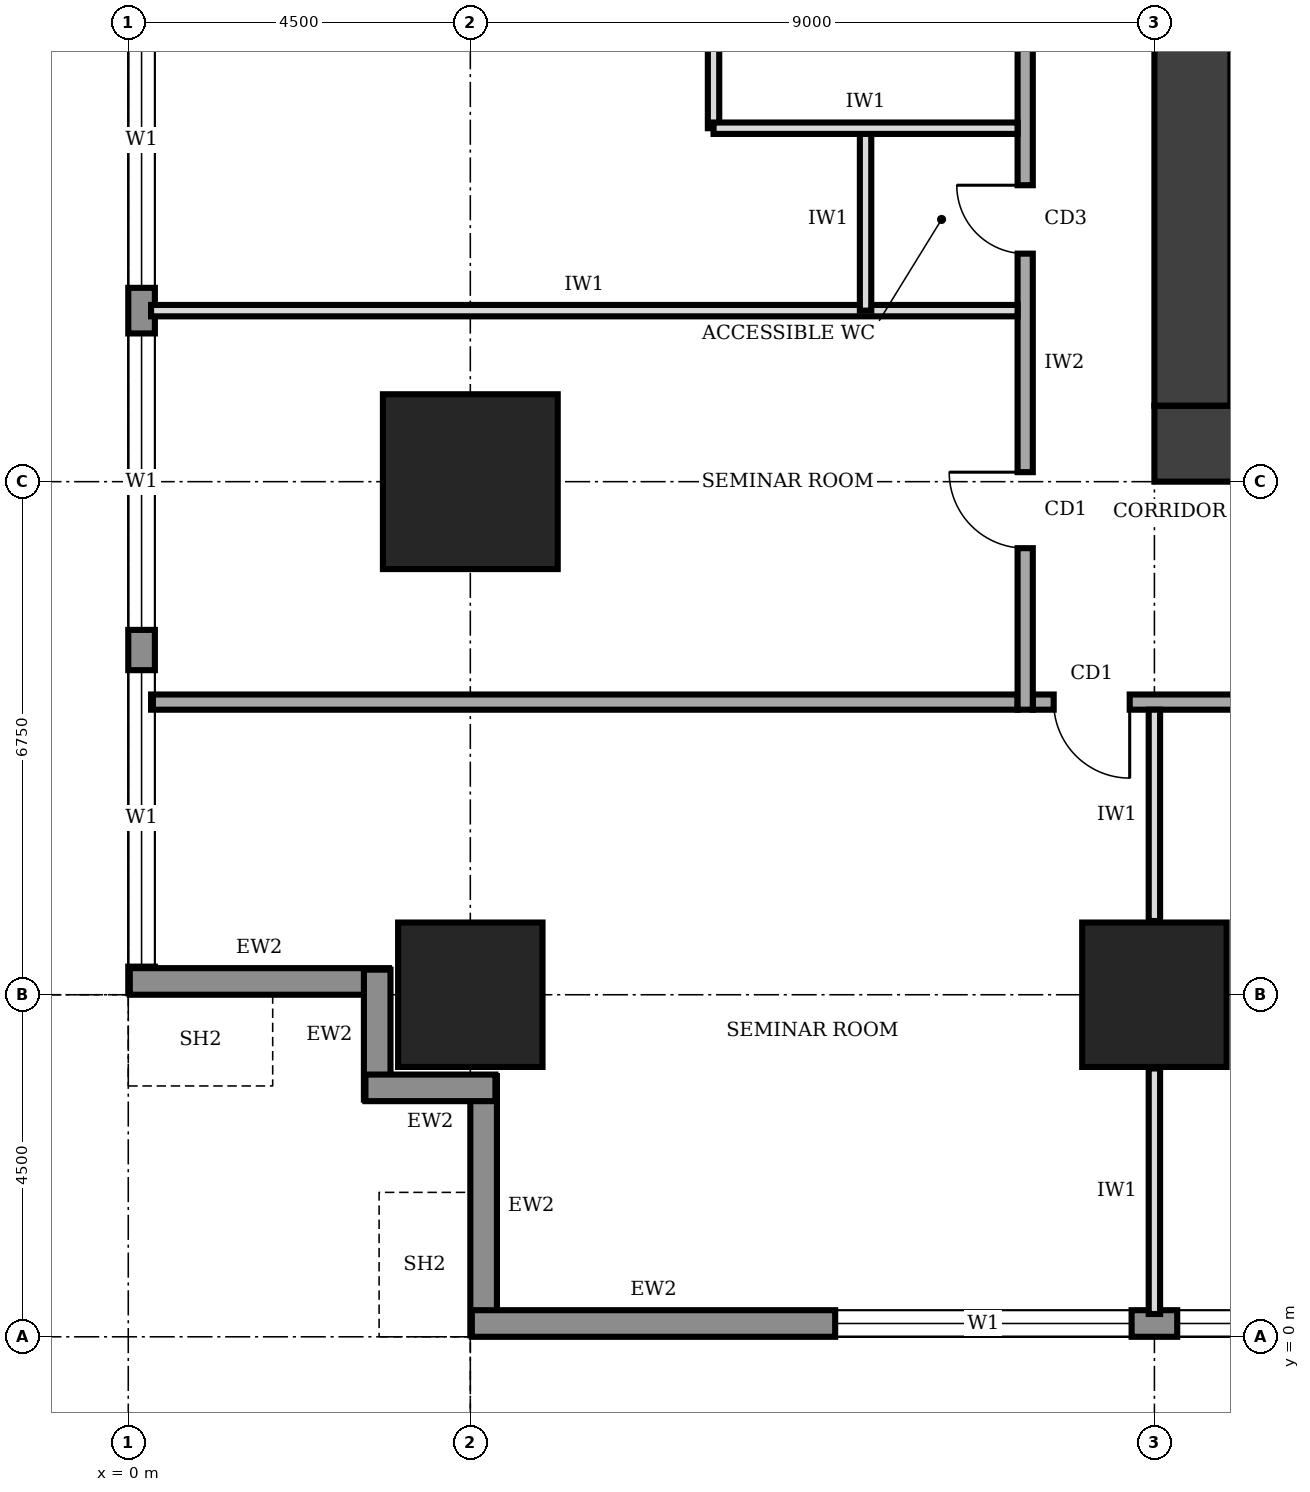
"""IFC4 building model, lengths in metres.
Left out: names, types, materials, properties, quantities, classifications, styles, units other than length and angle.
Written with IfcOpenShell. Run it as: python <this file> out.ifc"""

import sys

from ifc_helpers import new_model, si_unit, direction, frame, frame_2d, origin, origin_2d, place, context, subcontext, project, spatial, rectangle, extrude, element, fill, save


model = new_model("IFC4")
c1 = context("Model", 3, precision=1e-05, world=origin(), true_north=direction((0.0, 1.0)))
c2 = subcontext(c1, "Body", "Model", "MODEL_VIEW")
j1 = project(units=[si_unit("LENGTHUNIT", "METRE"), si_unit("PLANEANGLEUNIT", "RADIAN")], contexts=[c1])
p1 = place(None, origin())
s1 = spatial("IfcSite", under=j1, at=p1, CompositionType="ELEMENT")
p2 = place(p1, origin())
s2 = spatial("IfcBuilding", under=s1, at=p2, CompositionType="ELEMENT")
p3 = place(p2, frame((0.0, 0.0, 113.0)))
s3 = spatial("IfcBuildingStorey", under=s2, at=p3, CompositionType="ELEMENT", Elevation=113.0)
p4 = place(p3, frame((13.5, 11.75, 0.0), z_axis=(0.0, 0.0, 1.0), x_axis=(1.0, 0.0, 0.0)))
e1 = element("IfcWall", 1, at=p4, inside=s3, PredefinedType="SHEAR", context=c2, shape_type="SweptSolid", body=[
    extrude(rectangle(XDim=13.5, YDim=1.0, at=frame_2d((6.75, 0.0))), origin(), (0.0, 0.0, 1.0), 4.0),
])
p5 = place(p4, frame((4.75, 0.0, 0.0)))
e2 = element("IfcOpeningElement", 2, at=p5, cuts=e1, PredefinedType="OPENING", context=c2, shape_type="SweptSolid", body=[
    extrude(rectangle(XDim=1.0, YDim=2.1, at=frame_2d((0.5, 1.05))), frame((0.0, 0.51, 0.0), z_axis=(0.0, -1.0, 0.0), x_axis=(1.0, 0.0, 0.0)), (0.0, 0.0, 1.0), 1.02),
])
p6 = place(p3, frame((14.0, 28.25, 0.0), z_axis=(0.0, 0.0, 1.0), x_axis=(0.0, -1.0, 0.0)))
e3 = element("IfcWall", 3, at=p6, inside=s3, PredefinedType="SHEAR", context=c2, shape_type="SweptSolid", body=[
    extrude(rectangle(XDim=16.0, YDim=1.0, at=frame_2d((8.0, 0.0))), origin(), (0.0, 0.0, 1.0), 4.0),
])
for number, where, z_axis, x_axis in (
    (4, (4.5, 4.5, 0.0), (0.0, 0.0, 1.0), (1.0, 0.0, 0.0)),
    (5, (13.5, 4.5, 0.0), (0.0, 0.0, 1.0), (1.0, 0.0, 0.0)),
):
    element("IfcColumn", number, at=place(p3, frame(where, z_axis=z_axis, x_axis=x_axis)), inside=s3, PredefinedType="COLUMN", context=c2, shape_type="SweptSolid", body=[
        extrude(rectangle(XDim=1.9, YDim=1.9, at=origin_2d()), origin(), (0.0, 0.0, 1.0), 4.0),
    ])
p7 = place(p3, frame((4.5, 11.25, 0.0), z_axis=(0.0, 0.0, 1.0), x_axis=(1.0, 0.0, 0.0)))
e6 = element("IfcColumn", 6, at=p7, inside=s3, PredefinedType="COLUMN", context=c2, shape_type="SweptSolid", body=[
    extrude(rectangle(XDim=2.3, YDim=2.3, at=origin_2d()), origin(), (0.0, 0.0, 1.0), 4.0),
])
p8 = place(p3, frame((4.675, 3.43, 0.0), z_axis=(0.0, 0.0, 1.0), x_axis=(0.0, -1.0, 0.0)))
e7 = element("IfcWall", 7, at=p8, inside=s3, PredefinedType="STANDARD", context=c2, shape_type="SweptSolid", body=[
    extrude(rectangle(XDim=3.41, YDim=0.35, at=frame_2d((1.705, 0.0))), origin(), (0.0, 0.0, 1.0), 2.85),
])
p9 = place(p3, frame((4.52, 0.175, 0.0), z_axis=(0.0, 0.0, 1.0), x_axis=(1.0, 0.0, 0.0)))
e8 = element("IfcWall", 8, at=p9, inside=s3, PredefinedType="STANDARD", context=c2, shape_type="SweptSolid", body=[
    extrude(rectangle(XDim=31.46, YDim=0.35, at=frame_2d((15.73, 0.0))), origin(), (0.0, 0.0, 1.0), 3.75),
])
p10 = place(p9, frame((4.78, 0.0, 0.9)))
e9 = element("IfcOpeningElement", 9, at=p10, cuts=e8, PredefinedType="OPENING", context=c2, shape_type="SweptSolid", body=[
    extrude(rectangle(XDim=3.9, YDim=2.2, at=frame_2d((1.95, 1.1))), frame((0.0, 0.185, 0.0), z_axis=(0.0, -1.0, 0.0), x_axis=(1.0, 0.0, 0.0)), (0.0, 0.0, 1.0), 0.37),
])
p11 = place(p9, frame((9.28, 0.0, 0.9)))
e10 = element("IfcOpeningElement", 10, at=p11, cuts=e8, PredefinedType="OPENING", context=c2, shape_type="SweptSolid", body=[
    extrude(rectangle(XDim=3.9, YDim=2.2, at=frame_2d((1.95, 1.1))), frame((0.0, 0.185, 0.0), z_axis=(0.0, -1.0, 0.0), x_axis=(1.0, 0.0, 0.0)), (0.0, 0.0, 1.0), 0.37),
])
p12 = place(p9, frame((13.78, 0.0, 0.9)))
e11 = element("IfcOpeningElement", 11, at=p12, cuts=e8, PredefinedType="OPENING", context=c2, shape_type="SweptSolid", body=[
    extrude(rectangle(XDim=3.9, YDim=2.2, at=frame_2d((1.95, 1.1))), frame((0.0, 0.185, 0.0), z_axis=(0.0, -1.0, 0.0), x_axis=(1.0, 0.0, 0.0)), (0.0, 0.0, 1.0), 0.37),
])
p13 = place(p9, frame((18.28, 0.0, 0.9)))
e12 = element("IfcOpeningElement", 12, at=p13, cuts=e8, PredefinedType="OPENING", context=c2, shape_type="SweptSolid", body=[
    extrude(rectangle(XDim=3.9, YDim=2.2, at=frame_2d((1.95, 1.1))), frame((0.0, 0.185, 0.0), z_axis=(0.0, -1.0, 0.0), x_axis=(1.0, 0.0, 0.0)), (0.0, 0.0, 1.0), 0.37),
])
p14 = place(p9, frame((22.78, 0.0, 0.9)))
e13 = element("IfcOpeningElement", 13, at=p14, cuts=e8, PredefinedType="OPENING", context=c2, shape_type="SweptSolid", body=[
    extrude(rectangle(XDim=3.9, YDim=2.2, at=frame_2d((1.95, 1.1))), frame((0.0, 0.185, 0.0), z_axis=(0.0, -1.0, 0.0), x_axis=(1.0, 0.0, 0.0)), (0.0, 0.0, 1.0), 0.37),
])
p15 = place(p9, frame((27.21, 0.0, 0.9)))
e14 = element("IfcOpeningElement", 14, at=p15, cuts=e8, PredefinedType="OPENING", context=c2, shape_type="SweptSolid", body=[
    extrude(rectangle(XDim=3.9, YDim=2.2, at=frame_2d((1.95, 1.1))), frame((0.0, 0.185, 0.0), z_axis=(0.0, -1.0, 0.0), x_axis=(1.0, 0.0, 0.0)), (0.0, 0.0, 1.0), 0.37),
])
p16 = place(p3, frame((0.175, 35.98, 0.0), z_axis=(0.0, 0.0, 1.0), x_axis=(0.0, -1.0, 0.0)))
e15 = element("IfcWall", 15, at=p16, inside=s3, PredefinedType="STANDARD", context=c2, shape_type="SweptSolid", body=[
    extrude(rectangle(XDim=31.46, YDim=0.35, at=frame_2d((15.73, 0.0))), origin(), (0.0, 0.0, 1.0), 3.75),
])
p17 = place(p16, frame((27.21, 0.0, 0.9)))
e16 = element("IfcOpeningElement", 16, at=p17, cuts=e15, PredefinedType="OPENING", context=c2, shape_type="SweptSolid", body=[
    extrude(rectangle(XDim=3.9, YDim=2.2, at=frame_2d((1.95, 1.1))), frame((0.0, 0.185, 0.0), z_axis=(0.0, -1.0, 0.0), x_axis=(1.0, 0.0, 0.0)), (0.0, 0.0, 1.0), 0.37),
])
p18 = place(p16, frame((22.78, 0.0, 0.9)))
e17 = element("IfcOpeningElement", 17, at=p18, cuts=e15, PredefinedType="OPENING", context=c2, shape_type="SweptSolid", body=[
    extrude(rectangle(XDim=3.9, YDim=2.2, at=frame_2d((1.95, 1.1))), frame((0.0, 0.185, 0.0), z_axis=(0.0, -1.0, 0.0), x_axis=(1.0, 0.0, 0.0)), (0.0, 0.0, 1.0), 0.37),
])
p19 = place(p16, frame((18.28, 0.0, 0.9)))
e18 = element("IfcOpeningElement", 18, at=p19, cuts=e15, PredefinedType="OPENING", context=c2, shape_type="SweptSolid", body=[
    extrude(rectangle(XDim=3.9, YDim=2.2, at=frame_2d((1.95, 1.1))), frame((0.0, 0.185, 0.0), z_axis=(0.0, -1.0, 0.0), x_axis=(1.0, 0.0, 0.0)), (0.0, 0.0, 1.0), 0.37),
])
p20 = place(p16, frame((13.78, 0.0, 0.9)))
e19 = element("IfcOpeningElement", 19, at=p20, cuts=e15, PredefinedType="OPENING", context=c2, shape_type="SweptSolid", body=[
    extrude(rectangle(XDim=3.9, YDim=2.2, at=frame_2d((1.95, 1.1))), frame((0.0, 0.185, 0.0), z_axis=(0.0, -1.0, 0.0), x_axis=(1.0, 0.0, 0.0)), (0.0, 0.0, 1.0), 0.37),
])
p21 = place(p16, frame((9.28, 0.0, 0.9)))
e20 = element("IfcOpeningElement", 20, at=p21, cuts=e15, PredefinedType="OPENING", context=c2, shape_type="SweptSolid", body=[
    extrude(rectangle(XDim=3.9, YDim=2.2, at=frame_2d((1.95, 1.1))), frame((0.0, 0.185, 0.0), z_axis=(0.0, -1.0, 0.0), x_axis=(1.0, 0.0, 0.0)), (0.0, 0.0, 1.0), 0.37),
])
p22 = place(p16, frame((4.78, 0.0, 0.9)))
e21 = element("IfcOpeningElement", 21, at=p22, cuts=e15, PredefinedType="OPENING", context=c2, shape_type="SweptSolid", body=[
    extrude(rectangle(XDim=3.9, YDim=2.2, at=frame_2d((1.95, 1.1))), frame((0.0, 0.185, 0.0), z_axis=(0.0, -1.0, 0.0), x_axis=(1.0, 0.0, 0.0)), (0.0, 0.0, 1.0), 0.37),
])
p23 = place(p3, frame((0.02, 4.675, 0.0), z_axis=(0.0, 0.0, 1.0), x_axis=(1.0, 0.0, 0.0)))
e22 = element("IfcWall", 22, at=p23, inside=s3, PredefinedType="STANDARD", context=c2, shape_type="SweptSolid", body=[
    extrude(rectangle(XDim=3.41, YDim=0.35, at=frame_2d((1.705, 0.0))), origin(), (0.0, 0.0, 1.0), 2.85),
])
for number, where, z_axis, x_axis in (
    (23, (3.275, 4.83, 0.0), (0.0, 0.0, 1.0), (0.0, -1.0, 0.0)),
    (24, (3.12, 3.275, 0.0), (0.0, 0.0, 1.0), (1.0, 0.0, 0.0)),
):
    element("IfcWall", number, at=place(p3, frame(where, z_axis=z_axis, x_axis=x_axis)), inside=s3, PredefinedType="STANDARD", context=c2, shape_type="SweptSolid", body=[
        extrude(rectangle(XDim=1.71, YDim=0.35, at=frame_2d((0.855, 0.0))), origin(), (0.0, 0.0, 1.0), 3.75),
    ])
p24 = place(p3, frame((11.9, 8.35, 0.0), z_axis=(0.0, 0.0, 1.0), x_axis=(1.0, 0.0, 0.0)))
e25 = element("IfcWall", 25, at=p24, inside=s3, PredefinedType="SOLIDWALL", context=c2, shape_type="SweptSolid", body=[
    extrude(rectangle(XDim=16.9, YDim=0.2, at=frame_2d((8.45, 0.0))), origin(), (0.0, 0.0, 1.0), 3.75),
])
p25 = place(p24, frame((0.275, 0.0, 0.0)))
e26 = element("IfcOpeningElement", 26, at=p25, cuts=e25, PredefinedType="OPENING", context=c2, shape_type="SweptSolid", body=[
    extrude(rectangle(XDim=1.0, YDim=2.1, at=frame_2d((0.5, 1.05))), frame((0.0, 0.11, 0.0), z_axis=(0.0, -1.0, 0.0), x_axis=(1.0, 0.0, 0.0)), (0.0, 0.0, 1.0), 0.22),
])
p26 = place(p24, frame((5.6, 0.0, 0.0)))
e27 = element("IfcOpeningElement", 27, at=p26, cuts=e25, PredefinedType="OPENING", context=c2, shape_type="SweptSolid", body=[
    extrude(rectangle(XDim=1.0, YDim=2.1, at=frame_2d((0.5, 1.05))), frame((0.0, 0.11, 0.0), z_axis=(0.0, -1.0, 0.0), x_axis=(1.0, 0.0, 0.0)), (0.0, 0.0, 1.0), 0.22),
])
p27 = place(p24, frame((12.85, 0.0, 0.0)))
e28 = element("IfcOpeningElement", 28, at=p27, cuts=e25, PredefinedType="OPENING", context=c2, shape_type="SweptSolid", body=[
    extrude(rectangle(XDim=1.8, YDim=2.1, at=frame_2d((0.9, 1.05))), frame((0.0, 0.11, 0.0), z_axis=(0.0, -1.0, 0.0), x_axis=(1.0, 0.0, 0.0)), (0.0, 0.0, 1.0), 0.22),
])
p28 = place(p3, frame((11.8, 32.05, 0.0), z_axis=(0.0, 0.0, 1.0), x_axis=(0.0, -1.0, 0.0)))
e29 = element("IfcWall", 29, at=p28, inside=s3, PredefinedType="SOLIDWALL", context=c2, shape_type="SweptSolid", body=[
    extrude(rectangle(XDim=23.8, YDim=0.2, at=frame_2d((11.9, 0.0))), origin(), (0.0, 0.0, 1.0), 3.75),
])
p29 = place(p28, frame((20.675, 0.0, 0.0)))
e30 = element("IfcOpeningElement", 30, at=p29, cuts=e29, PredefinedType="OPENING", context=c2, shape_type="SweptSolid", body=[
    extrude(rectangle(XDim=1.0, YDim=2.1, at=frame_2d((0.5, 1.05))), frame((0.0, 0.11, 0.0), z_axis=(0.0, -1.0, 0.0), x_axis=(1.0, 0.0, 0.0)), (0.0, 0.0, 1.0), 0.22),
])
p30 = place(p28, frame((16.9, 0.0, 0.0)))
e31 = element("IfcOpeningElement", 31, at=p30, cuts=e29, PredefinedType="OPENING", context=c2, shape_type="SweptSolid", body=[
    extrude(rectangle(XDim=0.9, YDim=2.1, at=frame_2d((0.45, 1.05))), frame((0.0, 0.11, 0.0), z_axis=(0.0, -1.0, 0.0), x_axis=(1.0, 0.0, 0.0)), (0.0, 0.0, 1.0), 0.22),
])
p31 = place(p28, frame((13.7, 0.0, 0.0)))
e32 = element("IfcOpeningElement", 32, at=p31, cuts=e29, PredefinedType="OPENING", context=c2, shape_type="SweptSolid", body=[
    extrude(rectangle(XDim=0.9, YDim=2.1, at=frame_2d((0.45, 1.05))), frame((0.0, 0.11, 0.0), z_axis=(0.0, -1.0, 0.0), x_axis=(1.0, 0.0, 0.0)), (0.0, 0.0, 1.0), 0.22),
])
p32 = place(p28, frame((8.15, 0.0, 0.0)))
e33 = element("IfcOpeningElement", 33, at=p32, cuts=e29, PredefinedType="OPENING", context=c2, shape_type="SweptSolid", body=[
    extrude(rectangle(XDim=0.9, YDim=2.1, at=frame_2d((0.45, 1.05))), frame((0.0, 0.11, 0.0), z_axis=(0.0, -1.0, 0.0), x_axis=(1.0, 0.0, 0.0)), (0.0, 0.0, 1.0), 0.22),
])
p33 = place(p28, frame((5.55, 0.0, 0.0)))
e34 = element("IfcOpeningElement", 34, at=p33, cuts=e29, PredefinedType="OPENING", context=c2, shape_type="SweptSolid", body=[
    extrude(rectangle(XDim=1.0, YDim=2.1, at=frame_2d((0.5, 1.05))), frame((0.0, 0.11, 0.0), z_axis=(0.0, -1.0, 0.0), x_axis=(1.0, 0.0, 0.0)), (0.0, 0.0, 1.0), 0.22),
])
p34 = place(p28, frame((10.65, 0.0, 0.0)))
e35 = element("IfcOpeningElement", 35, at=p34, cuts=e29, PredefinedType="OPENING", context=c2, shape_type="SweptSolid", body=[
    extrude(rectangle(XDim=1.0, YDim=2.1, at=frame_2d((0.5, 1.05))), frame((0.0, 0.11, 0.0), z_axis=(0.0, -1.0, 0.0), x_axis=(1.0, 0.0, 0.0)), (0.0, 0.0, 1.0), 0.22),
])
p35 = place(p28, frame((1.925, 0.0, 0.0)))
e36 = element("IfcOpeningElement", 36, at=p35, cuts=e29, PredefinedType="OPENING", context=c2, shape_type="SweptSolid", body=[
    extrude(rectangle(XDim=1.0, YDim=2.1, at=frame_2d((0.5, 1.05))), frame((0.0, 0.11, 0.0), z_axis=(0.0, -1.0, 0.0), x_axis=(1.0, 0.0, 0.0)), (0.0, 0.0, 1.0), 0.22),
])
p36 = place(p3, frame((0.3, 8.35, 0.0), z_axis=(0.0, 0.0, 1.0), x_axis=(1.0, 0.0, 0.0)))
e37 = element("IfcWall", 37, at=p36, inside=s3, PredefinedType="SOLIDWALL", context=c2, shape_type="SweptSolid", body=[
    extrude(rectangle(XDim=11.4, YDim=0.2, at=frame_2d((5.7, 0.0))), origin(), (0.0, 0.0, 1.0), 3.75),
])
p37 = place(p3, frame((13.5, 0.3, 0.0), z_axis=(0.0, 0.0, 1.0), x_axis=(0.0, 1.0, 0.0)))
e38 = element("IfcWall", 38, at=p37, inside=s3, PredefinedType="PARTITIONING", context=c2, shape_type="SweptSolid", body=[
    extrude(rectangle(XDim=3.23, YDim=0.15, at=frame_2d((1.615, 0.0))), origin(), (0.0, 0.0, 1.0), 2.85),
])
p38 = place(p3, frame((13.5, 5.47, 0.0), z_axis=(0.0, 0.0, 1.0), x_axis=(0.0, 1.0, 0.0)))
e39 = element("IfcWall", 39, at=p38, inside=s3, PredefinedType="PARTITIONING", context=c2, shape_type="SweptSolid", body=[
    extrude(rectangle(XDim=2.78, YDim=0.15, at=frame_2d((1.39, 0.0))), origin(), (0.0, 0.0, 1.0), 2.85),
])
p39 = place(p3, frame((0.3, 13.5, 0.0), z_axis=(0.0, 0.0, 1.0), x_axis=(1.0, 0.0, 0.0)))
e40 = element("IfcWall", 40, at=p39, inside=s3, PredefinedType="PARTITIONING", context=c2, shape_type="SweptSolid", body=[
    extrude(rectangle(XDim=11.4, YDim=0.15, at=frame_2d((5.7, 0.0))), origin(), (0.0, 0.0, 1.0), 3.75),
])
p40 = place(p3, frame((11.7, 15.9, 0.0), z_axis=(0.0, 0.0, 1.0), x_axis=(-1.0, 0.0, 0.0)))
e41 = element("IfcWall", 41, at=p40, inside=s3, PredefinedType="PARTITIONING", context=c2, shape_type="SweptSolid", body=[
    extrude(rectangle(XDim=4.0, YDim=0.15, at=frame_2d((2.0, 0.0))), origin(), (0.0, 0.0, 1.0), 3.75),
])
p41 = place(p3, frame((9.7, 13.5, 0.0), z_axis=(0.0, 0.0, 1.0), x_axis=(0.0, 1.0, 0.0)))
e42 = element("IfcWall", 42, at=p41, inside=s3, PredefinedType="PARTITIONING", context=c2, shape_type="SweptSolid", body=[
    extrude(rectangle(XDim=2.4, YDim=0.15, at=frame_2d((1.2, 0.0))), origin(), (0.0, 0.0, 1.0), 3.75),
])
p42 = place(p3, frame((7.7, 15.9, 0.0), z_axis=(0.0, 0.0, 1.0), x_axis=(0.0, 1.0, 0.0)))
e43 = element("IfcWall", 43, at=p42, inside=s3, PredefinedType="PARTITIONING", context=c2, shape_type="SweptSolid", body=[
    extrude(rectangle(XDim=4.0, YDim=0.15, at=frame_2d((2.0, 0.0))), origin(), (0.0, 0.0, 1.0), 3.75),
])
p43 = place(p10, origin())
e44 = element("IfcWindow", 44, at=p43, inside=s3, PartitioningType="SINGLE_PANEL", PredefinedType="WINDOW", context=c2, shape_type="SweptSolid", body=[
    extrude(rectangle(XDim=3.9, YDim=2.2, at=frame_2d((1.95, 1.1))), frame((0.0, 0.03, 0.0), z_axis=(0.0, -1.0, 0.0), x_axis=(1.0, 0.0, 0.0)), (0.0, 0.0, 1.0), 0.06),
])
fill(e9, e44)
p44 = place(p11, origin())
e45 = element("IfcWindow", 45, at=p44, inside=s3, PartitioningType="SINGLE_PANEL", PredefinedType="WINDOW", context=c2, shape_type="SweptSolid", body=[
    extrude(rectangle(XDim=3.9, YDim=2.2, at=frame_2d((1.95, 1.1))), frame((0.0, 0.03, 0.0), z_axis=(0.0, -1.0, 0.0), x_axis=(1.0, 0.0, 0.0)), (0.0, 0.0, 1.0), 0.06),
])
fill(e10, e45)
p45 = place(p17, origin())
e46 = element("IfcWindow", 46, at=p45, inside=s3, PartitioningType="SINGLE_PANEL", PredefinedType="WINDOW", context=c2, shape_type="SweptSolid", body=[
    extrude(rectangle(XDim=3.9, YDim=2.2, at=frame_2d((1.95, 1.1))), frame((0.0, 0.03, 0.0), z_axis=(0.0, -1.0, 0.0), x_axis=(1.0, 0.0, 0.0)), (0.0, 0.0, 1.0), 0.06),
])
fill(e16, e46)
p46 = place(p18, origin())
e47 = element("IfcWindow", 47, at=p46, inside=s3, PartitioningType="SINGLE_PANEL", PredefinedType="WINDOW", context=c2, shape_type="SweptSolid", body=[
    extrude(rectangle(XDim=3.9, YDim=2.2, at=frame_2d((1.95, 1.1))), frame((0.0, 0.03, 0.0), z_axis=(0.0, -1.0, 0.0), x_axis=(1.0, 0.0, 0.0)), (0.0, 0.0, 1.0), 0.06),
])
fill(e17, e47)
p47 = place(p19, origin())
e48 = element("IfcWindow", 48, at=p47, inside=s3, PartitioningType="SINGLE_PANEL", PredefinedType="WINDOW", context=c2, shape_type="SweptSolid", body=[
    extrude(rectangle(XDim=3.9, YDim=2.2, at=frame_2d((1.95, 1.1))), frame((0.0, 0.03, 0.0), z_axis=(0.0, -1.0, 0.0), x_axis=(1.0, 0.0, 0.0)), (0.0, 0.0, 1.0), 0.06),
])
fill(e18, e48)
p48 = place(p25, frame((1.0, 0.0, 0.0), z_axis=(0.0, 0.0, 1.0), x_axis=(-1.0, 0.0, 0.0)))
e49 = element("IfcDoor", 49, at=p48, inside=s3, OperationType="SINGLE_SWING_LEFT", PredefinedType="DOOR", context=c2, shape_type="SweptSolid", body=[
    extrude(rectangle(XDim=1.0, YDim=2.1, at=frame_2d((0.5, 1.05))), frame((0.0, 0.025, 0.0), z_axis=(0.0, -1.0, 0.0), x_axis=(1.0, 0.0, 0.0)), (0.0, 0.0, 1.0), 0.05),
])
fill(e26, e49)
p49 = place(p29, frame((1.0, 0.0, 0.0), z_axis=(0.0, 0.0, 1.0), x_axis=(-1.0, 0.0, 0.0)))
e50 = element("IfcDoor", 50, at=p49, inside=s3, OperationType="SINGLE_SWING_RIGHT", PredefinedType="DOOR", context=c2, shape_type="SweptSolid", body=[
    extrude(rectangle(XDim=1.0, YDim=2.1, at=frame_2d((0.5, 1.05))), frame((0.0, 0.025, 0.0), z_axis=(0.0, -1.0, 0.0), x_axis=(1.0, 0.0, 0.0)), (0.0, 0.0, 1.0), 0.05),
])
fill(e30, e50)
p50 = place(p30, frame((0.9, 0.0, 0.0), z_axis=(0.0, 0.0, 1.0), x_axis=(-1.0, 0.0, 0.0)))
e51 = element("IfcDoor", 51, at=p50, inside=s3, OperationType="SINGLE_SWING_RIGHT", PredefinedType="DOOR", context=c2, shape_type="SweptSolid", body=[
    extrude(rectangle(XDim=0.9, YDim=2.1, at=frame_2d((0.45, 1.05))), frame((0.0, 0.025, 0.0), z_axis=(0.0, -1.0, 0.0), x_axis=(1.0, 0.0, 0.0)), (0.0, 0.0, 1.0), 0.05),
])
fill(e31, e51)
save(model, sys.argv[1])
